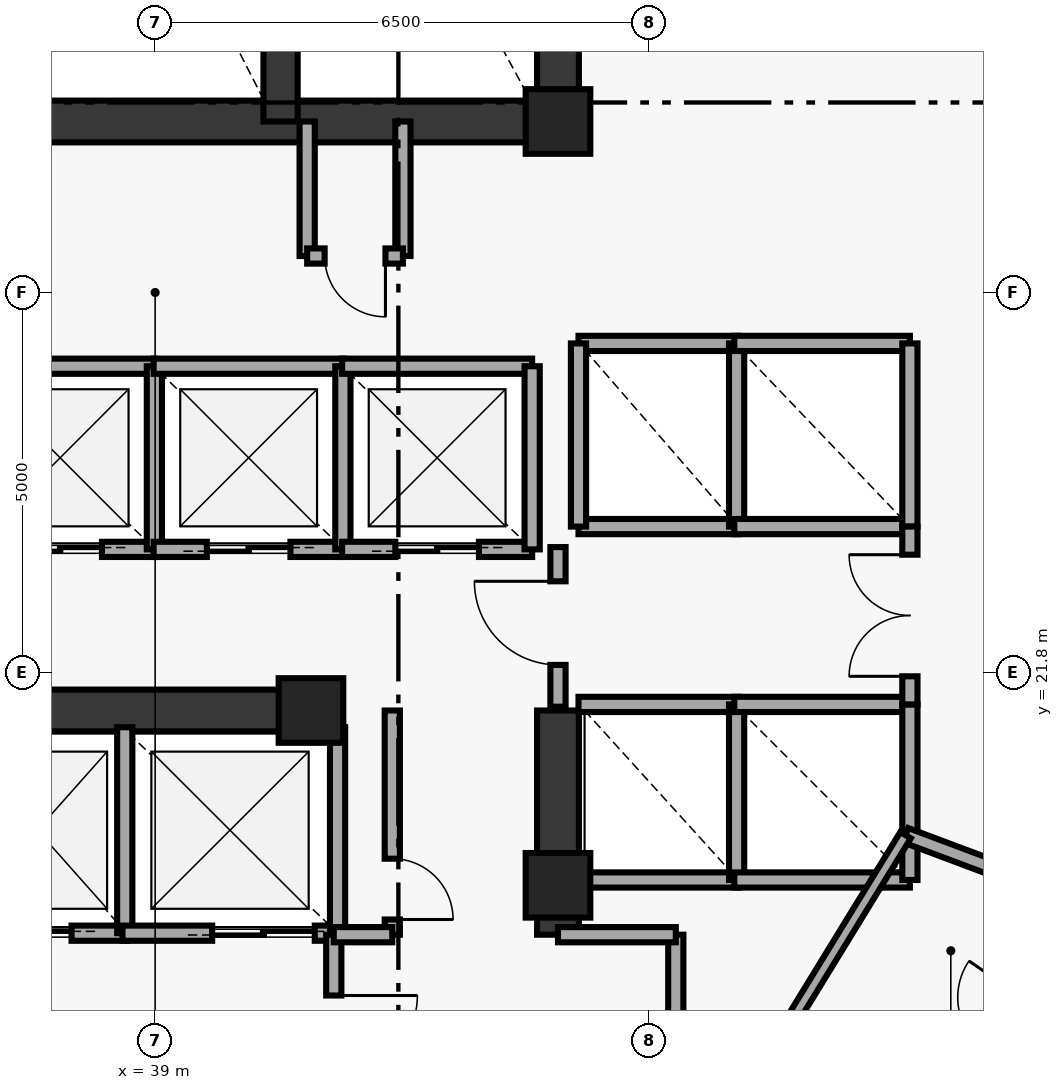
"""IFC4 building model, lengths in metres.
Left out: names, types, materials, properties, quantities, classifications, styles, units other than length and angle.
Written with IfcOpenShell. Run it as: python <this file> out.ifc"""

import sys

from ifc_helpers import new_model, si_unit, direction, frame, frame_2d, origin, origin_2d, place, context, subcontext, project, spatial, rectangle, extrude, element, fill, save


model = new_model("IFC4")
c1 = context("Model", 3, precision=1e-05, world=origin(), true_north=direction((0.0, 1.0)))
c2 = subcontext(c1, "Body", "Model", "MODEL_VIEW")
j1 = project(units=[si_unit("LENGTHUNIT", "METRE"), si_unit("PLANEANGLEUNIT", "RADIAN")], contexts=[c1])
p1 = place(None, origin())
s1 = spatial("IfcSite", under=j1, at=p1, CompositionType="ELEMENT")
p2 = place(p1, origin())
s2 = spatial("IfcBuilding", under=s1, at=p2, CompositionType="ELEMENT")
p3 = place(p2, frame((0.0, 0.0, 208.15)))
s3 = spatial("IfcBuildingStorey", under=s2, at=p3, CompositionType="ELEMENT", Elevation=208.15)
for number, where, z_axis, x_axis in (
    (1, (41.05, 21.3, 0.0), (0.0, 0.0, 1.0), (1.0, 0.0, 0.0)),
    (2, (44.3, 19.0, 0.0), (0.0, 0.0, 1.0), (1.0, 0.0, 0.0)),
    (3, (44.3, 29.05, 0.0), (0.0, 0.0, 1.0), (1.0, 0.0, 0.0)),
):
    element("IfcColumn", number, at=place(p3, frame(where, z_axis=z_axis, x_axis=x_axis)), inside=s3, PredefinedType="PILASTER", context=c2, shape_type="SweptSolid", body=[
        extrude(rectangle(XDim=0.85, YDim=0.85, at=origin_2d()), origin(), (0.0, 0.0, 1.0), 3.41),
    ])
p4 = place(p3, frame((44.3, 29.05, 0.0), z_axis=(0.0, 0.0, 1.0), x_axis=(0.0, 1.0, 0.0)))
e4 = element("IfcWall", 4, at=p4, inside=s3, PredefinedType="SHEAR", context=c2, shape_type="SweptSolid", body=[
    extrude(rectangle(XDim=8.35, YDim=0.55, at=frame_2d((4.175, 0.0))), origin(), (0.0, 0.0, 1.0), 3.41),
])
p5 = place(p3, frame((44.3, 18.35, 0.0), z_axis=(0.0, 0.0, 1.0), x_axis=(0.0, 1.0, 0.0)))
e5 = element("IfcWall", 5, at=p5, inside=s3, PredefinedType="SHEAR", context=c2, shape_type="SweptSolid", body=[
    extrude(rectangle(XDim=2.95, YDim=0.55, at=frame_2d((1.475, 0.0))), origin(), (0.0, 0.0, 1.0), 3.41),
])
p6 = place(p3, frame((33.7, 29.05, 0.0), z_axis=(0.0, 0.0, 1.0), x_axis=(1.0, 0.0, 0.0)))
e6 = element("IfcWall", 6, at=p6, inside=s3, PredefinedType="SHEAR", context=c2, shape_type="SweptSolid", body=[
    extrude(rectangle(XDim=10.6, YDim=0.55, at=frame_2d((5.3, 0.0))), origin(), (0.0, 0.0, 1.0), 3.41),
])
p7 = place(p3, frame((33.7, 21.3, 0.0), z_axis=(0.0, 0.0, 1.0), x_axis=(1.0, 0.0, 0.0)))
e7 = element("IfcWall", 7, at=p7, inside=s3, PredefinedType="SHEAR", context=c2, shape_type="SweptSolid", body=[
    extrude(rectangle(XDim=7.55, YDim=0.55, at=frame_2d((3.775, 0.0))), origin(), (0.0, 0.0, 1.0), 3.41),
])
p8 = place(p3, frame((40.65, 29.05, 0.0), z_axis=(0.0, 0.0, 1.0), x_axis=(0.0, 1.0, 0.0)))
e8 = element("IfcWall", 8, at=p8, inside=s3, PredefinedType="SHEAR", context=c2, shape_type="SweptSolid", body=[
    extrude(rectangle(XDim=8.35, YDim=0.45, at=frame_2d((4.175, 0.0))), origin(), (0.0, 0.0, 1.0), 3.41),
])
for number, where, z_axis, x_axis in (
    (9, (41.0, 27.28, 0.0), (0.0, 0.0, 1.0), (0.0, 1.0, 0.0)),
    (10, (42.26, 27.28, 0.0), (0.0, 0.0, 1.0), (0.0, 1.0, 0.0)),
):
    element("IfcWall", number, at=place(p3, frame(where, z_axis=z_axis, x_axis=x_axis)), inside=s3, PredefinedType="SOLIDWALL", context=c2, shape_type="SweptSolid", body=[
        extrude(rectangle(XDim=1.77, YDim=0.2, at=frame_2d((0.885, 0.0))), origin(), (0.0, 0.0, 1.0), 3.41),
    ])
p9 = place(p3, frame((41.0, 27.28, 0.0), z_axis=(0.0, 0.0, 1.0), x_axis=(1.0, 0.0, 0.0)))
e11 = element("IfcWall", 11, at=p9, inside=s3, PredefinedType="SOLIDWALL", context=c2, shape_type="SweptSolid", body=[
    extrude(rectangle(XDim=1.26, YDim=0.2, at=frame_2d((0.63, 0.0))), origin(), (0.0, 0.0, 1.0), 3.41),
])
p10 = place(p9, frame((0.23, 0.0, 0.0)))
e12 = element("IfcOpeningElement", 12, at=p10, cuts=e11, PredefinedType="OPENING", context=c2, shape_type="SweptSolid", body=[
    extrude(rectangle(XDim=0.8, YDim=2.05, at=frame_2d((0.4, 1.025))), frame((0.0, 0.11, 0.0), z_axis=(0.0, -1.0, 0.0), x_axis=(1.0, 0.0, 0.0)), (0.0, 0.0, 1.0), 0.22),
])
for number, where, z_axis, x_axis in (
    (13, (44.57, 23.72, 0.0), (0.0, 0.0, 1.0), (1.0, 0.0, 0.0)),
    (14, (44.57, 26.13, 0.0), (0.0, 0.0, 1.0), (1.0, 0.0, 0.0)),
):
    element("IfcWall", number, at=place(p3, frame(where, z_axis=z_axis, x_axis=x_axis)), inside=s3, PredefinedType="SOLIDWALL", context=c2, shape_type="SweptSolid", body=[
        extrude(rectangle(XDim=2.11, YDim=0.2, at=frame_2d((1.055, 0.0))), origin(), (0.0, 0.0, 1.0), 3.41),
    ])
for number, where, z_axis, x_axis in (
    (15, (44.57, 23.72, 0.0), (0.0, 0.0, 1.0), (0.0, 1.0, 0.0)),
    (16, (46.65, 23.72, 0.0), (0.0, 0.0, 1.0), (0.0, 1.0, 0.0)),
):
    element("IfcWall", number, at=place(p3, frame(where, z_axis=z_axis, x_axis=x_axis)), inside=s3, PredefinedType="SOLIDWALL", context=c2, shape_type="SweptSolid", body=[
        extrude(rectangle(XDim=2.41, YDim=0.2, at=frame_2d((1.205, 0.0))), origin(), (0.0, 0.0, 1.0), 3.41),
    ])
for number, where, z_axis, x_axis in (
    (17, (46.62, 23.72, 0.0), (0.0, 0.0, 1.0), (1.0, 0.0, 0.0)),
    (18, (46.62, 26.13, 0.0), (0.0, 0.0, 1.0), (1.0, 0.0, 0.0)),
):
    element("IfcWall", number, at=place(p3, frame(where, z_axis=z_axis, x_axis=x_axis)), inside=s3, PredefinedType="SOLIDWALL", context=c2, shape_type="SweptSolid", body=[
        extrude(rectangle(XDim=2.31, YDim=0.2, at=frame_2d((1.155, 0.0))), origin(), (0.0, 0.0, 1.0), 3.41),
    ])
p11 = place(p3, frame((48.93, 23.72, 0.0), z_axis=(0.0, 0.0, 1.0), x_axis=(0.0, 1.0, 0.0)))
e19 = element("IfcWall", 19, at=p11, inside=s3, PredefinedType="SOLIDWALL", context=c2, shape_type="SweptSolid", body=[
    extrude(rectangle(XDim=2.41, YDim=0.2, at=frame_2d((1.205, 0.0))), origin(), (0.0, 0.0, 1.0), 3.41),
])
for number, where, z_axis, x_axis in (
    (20, (44.57, 19.07, 0.0), (0.0, 0.0, 1.0), (1.0, 0.0, 0.0)),
    (21, (44.57, 21.38, 0.0), (0.0, 0.0, 1.0), (1.0, 0.0, 0.0)),
):
    element("IfcWall", number, at=place(p3, frame(where, z_axis=z_axis, x_axis=x_axis)), inside=s3, PredefinedType="SOLIDWALL", context=c2, shape_type="SweptSolid", body=[
        extrude(rectangle(XDim=2.11, YDim=0.2, at=frame_2d((1.055, 0.0))), origin(), (0.0, 0.0, 1.0), 3.41),
    ])
for number, where, z_axis, x_axis in (
    (22, (46.65, 19.07, 0.0), (0.0, 0.0, 1.0), (0.0, 1.0, 0.0)),
    (23, (46.62, 19.07, 0.0), (0.0, 0.0, 1.0), (1.0, 0.0, 0.0)),
    (24, (46.62, 21.38, 0.0), (0.0, 0.0, 1.0), (1.0, 0.0, 0.0)),
    (25, (48.93, 19.07, 0.0), (0.0, 0.0, 1.0), (0.0, 1.0, 0.0)),
):
    element("IfcWall", number, at=place(p3, frame(where, z_axis=z_axis, x_axis=x_axis)), inside=s3, PredefinedType="SOLIDWALL", context=c2, shape_type="SweptSolid", body=[
        extrude(rectangle(XDim=2.31, YDim=0.2, at=frame_2d((1.155, 0.0))), origin(), (0.0, 0.0, 1.0), 3.41),
    ])
p12 = place(p3, frame((36.5, 23.42, 0.0), z_axis=(0.0, 0.0, 1.0), x_axis=(1.0, 0.0, 0.0)))
e26 = element("IfcWall", 26, at=p12, inside=s3, PredefinedType="SOLIDWALL", context=c2, shape_type="SweptSolid", body=[
    extrude(rectangle(XDim=2.5, YDim=0.2, at=frame_2d((1.25, 0.0))), origin(), (0.0, 0.0, 1.0), 3.41),
])
p13 = place(p12, frame((0.7, 0.0, 0.0)))
e27 = element("IfcOpeningElement", 27, at=p13, cuts=e26, PredefinedType="OPENING", context=c2, shape_type="SweptSolid", body=[
    extrude(rectangle(XDim=1.1, YDim=2.15, at=frame_2d((0.55, 1.075))), frame((0.0, 0.11, 0.0), z_axis=(0.0, -1.0, 0.0), x_axis=(1.0, 0.0, 0.0)), (0.0, 0.0, 1.0), 0.22),
])
p14 = place(p3, frame((36.5, 25.83, 0.0), z_axis=(0.0, 0.0, 1.0), x_axis=(1.0, 0.0, 0.0)))
e28 = element("IfcWall", 28, at=p14, inside=s3, PredefinedType="SOLIDWALL", context=c2, shape_type="SweptSolid", body=[
    extrude(rectangle(XDim=2.5, YDim=0.2, at=frame_2d((1.25, 0.0))), origin(), (0.0, 0.0, 1.0), 3.41),
])
p15 = place(p3, frame((38.99, 23.42, 0.0), z_axis=(0.0, 0.0, 1.0), x_axis=(0.0, 1.0, 0.0)))
e29 = element("IfcWall", 29, at=p15, inside=s3, PredefinedType="SOLIDWALL", context=c2, shape_type="SweptSolid", body=[
    extrude(rectangle(XDim=2.41, YDim=0.2, at=frame_2d((1.205, 0.0))), origin(), (0.0, 0.0, 1.0), 3.41),
])
p16 = place(p3, frame((38.98, 23.42, 0.0), z_axis=(0.0, 0.0, 1.0), x_axis=(1.0, 0.0, 0.0)))
e30 = element("IfcWall", 30, at=p16, inside=s3, PredefinedType="SOLIDWALL", context=c2, shape_type="SweptSolid", body=[
    extrude(rectangle(XDim=2.5, YDim=0.2, at=frame_2d((1.25, 0.0))), origin(), (0.0, 0.0, 1.0), 3.41),
])
p17 = place(p16, frame((0.7, 0.0, 0.0)))
e31 = element("IfcOpeningElement", 31, at=p17, cuts=e30, PredefinedType="OPENING", context=c2, shape_type="SweptSolid", body=[
    extrude(rectangle(XDim=1.1, YDim=2.15, at=frame_2d((0.55, 1.075))), frame((0.0, 0.11, 0.0), z_axis=(0.0, -1.0, 0.0), x_axis=(1.0, 0.0, 0.0)), (0.0, 0.0, 1.0), 0.22),
])
p18 = place(p3, frame((38.98, 25.83, 0.0), z_axis=(0.0, 0.0, 1.0), x_axis=(1.0, 0.0, 0.0)))
e32 = element("IfcWall", 32, at=p18, inside=s3, PredefinedType="SOLIDWALL", context=c2, shape_type="SweptSolid", body=[
    extrude(rectangle(XDim=2.5, YDim=0.2, at=frame_2d((1.25, 0.0))), origin(), (0.0, 0.0, 1.0), 3.41),
])
p19 = place(p3, frame((41.47, 23.42, 0.0), z_axis=(0.0, 0.0, 1.0), x_axis=(0.0, 1.0, 0.0)))
e33 = element("IfcWall", 33, at=p19, inside=s3, PredefinedType="SOLIDWALL", context=c2, shape_type="SweptSolid", body=[
    extrude(rectangle(XDim=2.41, YDim=0.2, at=frame_2d((1.205, 0.0))), origin(), (0.0, 0.0, 1.0), 3.41),
])
p20 = place(p3, frame((41.46, 23.42, 0.0), z_axis=(0.0, 0.0, 1.0), x_axis=(1.0, 0.0, 0.0)))
e34 = element("IfcWall", 34, at=p20, inside=s3, PredefinedType="SOLIDWALL", context=c2, shape_type="SweptSolid", body=[
    extrude(rectangle(XDim=2.5, YDim=0.2, at=frame_2d((1.25, 0.0))), origin(), (0.0, 0.0, 1.0), 3.41),
])
p21 = place(p20, frame((0.7, 0.0, 0.0)))
e35 = element("IfcOpeningElement", 35, at=p21, cuts=e34, PredefinedType="OPENING", context=c2, shape_type="SweptSolid", body=[
    extrude(rectangle(XDim=1.1, YDim=2.15, at=frame_2d((0.55, 1.075))), frame((0.0, 0.11, 0.0), z_axis=(0.0, -1.0, 0.0), x_axis=(1.0, 0.0, 0.0)), (0.0, 0.0, 1.0), 0.22),
])
p22 = place(p3, frame((41.46, 25.83, 0.0), z_axis=(0.0, 0.0, 1.0), x_axis=(1.0, 0.0, 0.0)))
e36 = element("IfcWall", 36, at=p22, inside=s3, PredefinedType="SOLIDWALL", context=c2, shape_type="SweptSolid", body=[
    extrude(rectangle(XDim=2.5, YDim=0.2, at=frame_2d((1.25, 0.0))), origin(), (0.0, 0.0, 1.0), 3.41),
])
p23 = place(p3, frame((43.96, 23.42, 0.0), z_axis=(0.0, 0.0, 1.0), x_axis=(0.0, 1.0, 0.0)))
e37 = element("IfcWall", 37, at=p23, inside=s3, PredefinedType="SOLIDWALL", context=c2, shape_type="SweptSolid", body=[
    extrude(rectangle(XDim=2.41, YDim=0.2, at=frame_2d((1.205, 0.0))), origin(), (0.0, 0.0, 1.0), 3.41),
])
p24 = place(p3, frame((36.27, 18.37, 0.0), z_axis=(0.0, 0.0, 1.0), x_axis=(1.0, 0.0, 0.0)))
e38 = element("IfcWall", 38, at=p24, inside=s3, PredefinedType="SOLIDWALL", context=c2, shape_type="SweptSolid", body=[
    extrude(rectangle(XDim=2.36, YDim=0.2, at=frame_2d((1.18, 0.0))), origin(), (0.0, 0.0, 1.0), 3.41),
])
p25 = place(p24, frame((0.38, 0.0, 0.0)))
e39 = element("IfcOpeningElement", 39, at=p25, cuts=e38, PredefinedType="OPENING", context=c2, shape_type="SweptSolid", body=[
    extrude(rectangle(XDim=1.25, YDim=2.2, at=frame_2d((0.625, 1.1))), frame((0.0, 0.11, 0.0), z_axis=(0.0, -1.0, 0.0), x_axis=(1.0, 0.0, 0.0)), (0.0, 0.0, 1.0), 0.22),
])
p26 = place(p3, frame((38.6, 18.37, 0.0), z_axis=(0.0, 0.0, 1.0), x_axis=(0.0, 1.0, 0.0)))
e40 = element("IfcWall", 40, at=p26, inside=s3, PredefinedType="SOLIDWALL", context=c2, shape_type="SweptSolid", body=[
    extrude(rectangle(XDim=2.71, YDim=0.2, at=frame_2d((1.355, 0.0))), origin(), (0.0, 0.0, 1.0), 3.41),
])
p27 = place(p3, frame((38.57, 18.37, 0.0), z_axis=(0.0, 0.0, 1.0), x_axis=(1.0, 0.0, 0.0)))
e41 = element("IfcWall", 41, at=p27, inside=s3, PredefinedType="SOLIDWALL", context=c2, shape_type="SweptSolid", body=[
    extrude(rectangle(XDim=2.83, YDim=0.2, at=frame_2d((1.415, 0.0))), origin(), (0.0, 0.0, 1.0), 3.41),
])
p28 = place(p27, frame((1.18, 0.0, 0.0)))
e42 = element("IfcOpeningElement", 42, at=p28, cuts=e41, PredefinedType="OPENING", context=c2, shape_type="SweptSolid", body=[
    extrude(rectangle(XDim=1.35, YDim=2.18, at=frame_2d((0.675, 1.09))), frame((0.0, 0.11, 0.0), z_axis=(0.0, -1.0, 0.0), x_axis=(1.0, 0.0, 0.0)), (0.0, 0.0, 1.0), 0.22),
])
p29 = place(p3, frame((41.4, 18.37, 0.0), z_axis=(0.0, 0.0, 1.0), x_axis=(0.0, 1.0, 0.0)))
e43 = element("IfcWall", 43, at=p29, inside=s3, PredefinedType="SOLIDWALL", context=c2, shape_type="SweptSolid", body=[
    extrude(rectangle(XDim=2.71, YDim=0.2, at=frame_2d((1.355, 0.0))), origin(), (0.0, 0.0, 1.0), 3.41),
])
p30 = place(p3, frame((48.93, 21.38, 0.0), z_axis=(0.0, 0.0, 1.0), x_axis=(0.0, 1.0, 0.0)))
e44 = element("IfcWall", 44, at=p30, inside=s3, PredefinedType="SOLIDWALL", context=c2, shape_type="SweptSolid", body=[
    extrude(rectangle(XDim=2.34, YDim=0.2, at=frame_2d((1.17, 0.0))), origin(), (0.0, 0.0, 1.0), 3.41),
])
p31 = place(p30, frame((0.37, 0.0, 0.0)))
e45 = element("IfcOpeningElement", 45, at=p31, cuts=e44, PredefinedType="OPENING", context=c2, shape_type="SweptSolid", body=[
    extrude(rectangle(XDim=1.6, YDim=2.2, at=frame_2d((0.8, 1.1))), frame((0.0, 0.11, 0.0), z_axis=(0.0, -1.0, 0.0), x_axis=(1.0, 0.0, 0.0)), (0.0, 0.0, 1.0), 0.22),
])
p32 = place(p3, frame((44.3, 21.35, 0.0), z_axis=(0.0, 0.0, 1.0), x_axis=(0.0, 1.0, 0.0)))
e46 = element("IfcWall", 46, at=p32, inside=s3, PredefinedType="SOLIDWALL", context=c2, shape_type="SweptSolid", body=[
    extrude(rectangle(XDim=2.1, YDim=0.2, at=frame_2d((1.05, 0.0))), origin(), (0.0, 0.0, 1.0), 2.795),
])
p33 = place(p32, frame((0.55, 0.0, 0.0)))
e47 = element("IfcOpeningElement", 47, at=p33, cuts=e46, PredefinedType="OPENING", context=c2, shape_type="SweptSolid", body=[
    extrude(rectangle(XDim=1.1, YDim=2.15, at=frame_2d((0.55, 1.075))), frame((0.0, 0.11, 0.0), z_axis=(0.0, -1.0, 0.0), x_axis=(1.0, 0.0, 0.0)), (0.0, 0.0, 1.0), 0.22),
])
p34 = place(p3, frame((41.35, 15.55, 0.0), z_axis=(0.0, 0.0, 1.0), x_axis=(0.0, 1.0, 0.0)))
e48 = element("IfcWall", 48, at=p34, inside=s3, PredefinedType="SOLIDWALL", context=c2, shape_type="SweptSolid", body=[
    extrude(rectangle(XDim=2.8, YDim=0.2, at=frame_2d((1.4, 0.0))), origin(), (0.0, 0.0, 1.0), 3.41),
])
p35 = place(p34, frame((0.9, 0.0, 0.0)))
e49 = element("IfcOpeningElement", 49, at=p35, cuts=e48, PredefinedType="OPENING", context=c2, shape_type="SweptSolid", body=[
    extrude(rectangle(XDim=1.1, YDim=2.15, at=frame_2d((0.55, 1.075))), frame((0.0, 0.11, 0.0), z_axis=(0.0, -1.0, 0.0), x_axis=(1.0, 0.0, 0.0)), (0.0, 0.0, 1.0), 0.22),
])
p36 = place(p3, frame((45.85, 16.05, 0.0), z_axis=(0.0, 0.0, 1.0), x_axis=(0.0, 1.0, 0.0)))
e50 = element("IfcWall", 50, at=p36, inside=s3, PredefinedType="SOLIDWALL", context=c2, shape_type="SweptSolid", body=[
    extrude(rectangle(XDim=2.3, YDim=0.2, at=frame_2d((1.15, 0.0))), origin(), (0.0, 0.0, 1.0), 3.41),
])
p37 = place(p3, frame((44.3, 18.35, 0.0), z_axis=(0.0, 0.0, 1.0), x_axis=(1.0, 0.0, 0.0)))
e51 = element("IfcWall", 51, at=p37, inside=s3, PredefinedType="SOLIDWALL", context=c2, shape_type="SweptSolid", body=[
    extrude(rectangle(XDim=1.55, YDim=0.2, at=frame_2d((0.775, 0.0))), origin(), (0.0, 0.0, 1.0), 3.41),
])
p38 = place(p3, frame((42.12, 18.35, 0.0), z_axis=(0.0, 0.0, 1.0), x_axis=(0.0, 1.0, 0.0)))
e52 = element("IfcWall", 52, at=p38, inside=s3, PredefinedType="SOLIDWALL", context=c2, shape_type="SweptSolid", body=[
    extrude(rectangle(XDim=2.95, YDim=0.2, at=frame_2d((1.475, 0.0))), origin(), (0.0, 0.0, 1.0), 3.41),
])
p39 = place(p38, frame((0.2, 0.0, 0.0)))
e53 = element("IfcOpeningElement", 53, at=p39, cuts=e52, PredefinedType="OPENING", context=c2, shape_type="SweptSolid", body=[
    extrude(rectangle(XDim=0.8, YDim=2.05, at=frame_2d((0.4, 1.025))), frame((0.0, 0.11, 0.0), z_axis=(0.0, -1.0, 0.0), x_axis=(1.0, 0.0, 0.0)), (0.0, 0.0, 1.0), 0.22),
])
p40 = place(p3, frame((41.35, 18.35, 0.0), z_axis=(0.0, 0.0, 1.0), x_axis=(1.0, 0.0, 0.0)))
e54 = element("IfcWall", 54, at=p40, inside=s3, PredefinedType="SOLIDWALL", context=c2, shape_type="SweptSolid", body=[
    extrude(rectangle(XDim=0.77, YDim=0.2, at=frame_2d((0.385, 0.0))), origin(), (0.0, 0.0, 1.0), 3.41),
])
p41 = place(p3, frame((48.873, 19.66, 0.0), z_axis=(0.0, 0.0, 1.0), x_axis=(0.93631333527, -0.351165684821, 0.0)))
e55 = element("IfcWall", 55, at=p41, inside=s3, PredefinedType="PARTITIONING", context=c2, shape_type="SweptSolid", body=[
    extrude(rectangle(XDim=1.267, YDim=0.2, at=frame_2d((0.633, 0.0))), origin(), (0.0, 0.0, 1.0), 3.41),
])
p42 = place(p3, frame((47.061, 16.703, 0.0), z_axis=(0.0, 0.0, 1.0), x_axis=(0.522486120877, 0.852647789823, 0.0)))
e56 = element("IfcWall", 56, at=p42, inside=s3, PredefinedType="PARTITIONING", context=c2, shape_type="SweptSolid", body=[
    extrude(rectangle(XDim=3.468, YDim=0.16, at=frame_2d((1.734, 0.0))), origin(), (0.0, 0.0, 1.0), 3.41),
])
p43 = place(p3, frame((51.298, 18.825, 0.0), z_axis=(0.0, 0.0, 1.0), x_axis=(-0.56419813198, -0.825639429697, 0.0)))
e57 = element("IfcWall", 57, at=p43, inside=s3, PredefinedType="PARTITIONING", context=c2, shape_type="SweptSolid", body=[
    extrude(rectangle(XDim=4.0, YDim=0.14, at=frame_2d((2.0, 0.0))), origin(), (0.0, 0.0, 1.0), 3.41),
])
p44 = place(p43, frame((1.575, 0.0, 0.0)))
e58 = element("IfcOpeningElement", 58, at=p44, cuts=e57, PredefinedType="OPENING", context=c2, shape_type="SweptSolid", body=[
    extrude(rectangle(XDim=0.85, YDim=2.1, at=frame_2d((0.425, 1.05))), frame((0.0, 0.08, 0.0), z_axis=(0.0, -1.0, 0.0), x_axis=(1.0, 0.0, 0.0)), (0.0, 0.0, 1.0), 0.16),
])
p45 = place(p10, origin())
e59 = element("IfcDoor", 59, at=p45, inside=s3, OperationType="SINGLE_SWING_RIGHT", PredefinedType="DOOR", context=c2, shape_type="SweptSolid", body=[
    extrude(rectangle(XDim=0.8, YDim=2.05, at=frame_2d((0.4, 1.025))), frame((0.0, 0.025, 0.0), z_axis=(0.0, -1.0, 0.0), x_axis=(1.0, 0.0, 0.0)), (0.0, 0.0, 1.0), 0.05),
])
fill(e12, e59)
p46 = place(p13, origin())
e60 = element("IfcDoor", 60, at=p46, inside=s3, OperationType="DOUBLE_DOOR_SLIDING", PredefinedType="DOOR", context=c2, shape_type="SweptSolid", body=[
    extrude(rectangle(XDim=1.1, YDim=2.15, at=frame_2d((0.55, 1.075))), frame((0.0, 0.025, 0.0), z_axis=(0.0, -1.0, 0.0), x_axis=(1.0, 0.0, 0.0)), (0.0, 0.0, 1.0), 0.05),
])
fill(e27, e60)
p47 = place(p17, origin())
e61 = element("IfcDoor", 61, at=p47, inside=s3, OperationType="DOUBLE_DOOR_SLIDING", PredefinedType="DOOR", context=c2, shape_type="SweptSolid", body=[
    extrude(rectangle(XDim=1.1, YDim=2.15, at=frame_2d((0.55, 1.075))), frame((0.0, 0.025, 0.0), z_axis=(0.0, -1.0, 0.0), x_axis=(1.0, 0.0, 0.0)), (0.0, 0.0, 1.0), 0.05),
])
fill(e31, e61)
p48 = place(p21, origin())
e62 = element("IfcDoor", 62, at=p48, inside=s3, OperationType="DOUBLE_DOOR_SLIDING", PredefinedType="DOOR", context=c2, shape_type="SweptSolid", body=[
    extrude(rectangle(XDim=1.1, YDim=2.15, at=frame_2d((0.55, 1.075))), frame((0.0, 0.025, 0.0), z_axis=(0.0, -1.0, 0.0), x_axis=(1.0, 0.0, 0.0)), (0.0, 0.0, 1.0), 0.05),
])
fill(e35, e62)
p49 = place(p25, origin())
e63 = element("IfcDoor", 63, at=p49, inside=s3, OperationType="DOUBLE_DOOR_SLIDING", PredefinedType="DOOR", context=c2, shape_type="SweptSolid", body=[
    extrude(rectangle(XDim=1.25, YDim=2.2, at=frame_2d((0.625, 1.1))), frame((0.0, 0.025, 0.0), z_axis=(0.0, -1.0, 0.0), x_axis=(1.0, 0.0, 0.0)), (0.0, 0.0, 1.0), 0.05),
])
fill(e39, e63)
p50 = place(p28, origin())
e64 = element("IfcDoor", 64, at=p50, inside=s3, OperationType="DOUBLE_DOOR_SLIDING", PredefinedType="DOOR", context=c2, shape_type="SweptSolid", body=[
    extrude(rectangle(XDim=1.35, YDim=2.18, at=frame_2d((0.675, 1.09))), frame((0.0, 0.025, 0.0), z_axis=(0.0, -1.0, 0.0), x_axis=(1.0, 0.0, 0.0)), (0.0, 0.0, 1.0), 0.05),
])
fill(e42, e64)
p51 = place(p31, origin())
e65 = element("IfcDoor", 65, at=p51, inside=s3, OperationType="DOUBLE_DOOR_SINGLE_SWING", PredefinedType="DOOR", context=c2, shape_type="SweptSolid", body=[
    extrude(rectangle(XDim=1.6, YDim=2.2, at=frame_2d((0.8, 1.1))), frame((0.0, 0.025, 0.0), z_axis=(0.0, -1.0, 0.0), x_axis=(1.0, 0.0, 0.0)), (0.0, 0.0, 1.0), 0.05),
])
fill(e45, e65)
p52 = place(p33, origin())
e66 = element("IfcDoor", 66, at=p52, inside=s3, OperationType="SINGLE_SWING_RIGHT", PredefinedType="DOOR", context=c2, shape_type="SweptSolid", body=[
    extrude(rectangle(XDim=1.1, YDim=2.15, at=frame_2d((0.55, 1.075))), frame((0.0, 0.025, 0.0), z_axis=(0.0, -1.0, 0.0), x_axis=(1.0, 0.0, 0.0)), (0.0, 0.0, 1.0), 0.05),
])
fill(e47, e66)
p53 = place(p35, origin())
e67 = element("IfcDoor", 67, at=p53, inside=s3, OperationType="SINGLE_SWING_RIGHT", PredefinedType="DOOR", context=c2, shape_type="SweptSolid", body=[
    extrude(rectangle(XDim=1.1, YDim=2.15, at=frame_2d((0.55, 1.075))), frame((0.0, 0.025, 0.0), z_axis=(0.0, -1.0, 0.0), x_axis=(1.0, 0.0, 0.0)), (0.0, 0.0, 1.0), 0.05),
])
fill(e49, e67)
p54 = place(p39, origin())
e68 = element("IfcDoor", 68, at=p54, inside=s3, OperationType="SINGLE_SWING_LEFT", PredefinedType="DOOR", context=c2, shape_type="SweptSolid", body=[
    extrude(rectangle(XDim=0.8, YDim=2.05, at=frame_2d((0.4, 1.025))), frame((0.0, 0.025, 0.0), z_axis=(0.0, -1.0, 0.0), x_axis=(1.0, 0.0, 0.0)), (0.0, 0.0, 1.0), 0.05),
])
fill(e53, e68)
save(model, sys.argv[1])
